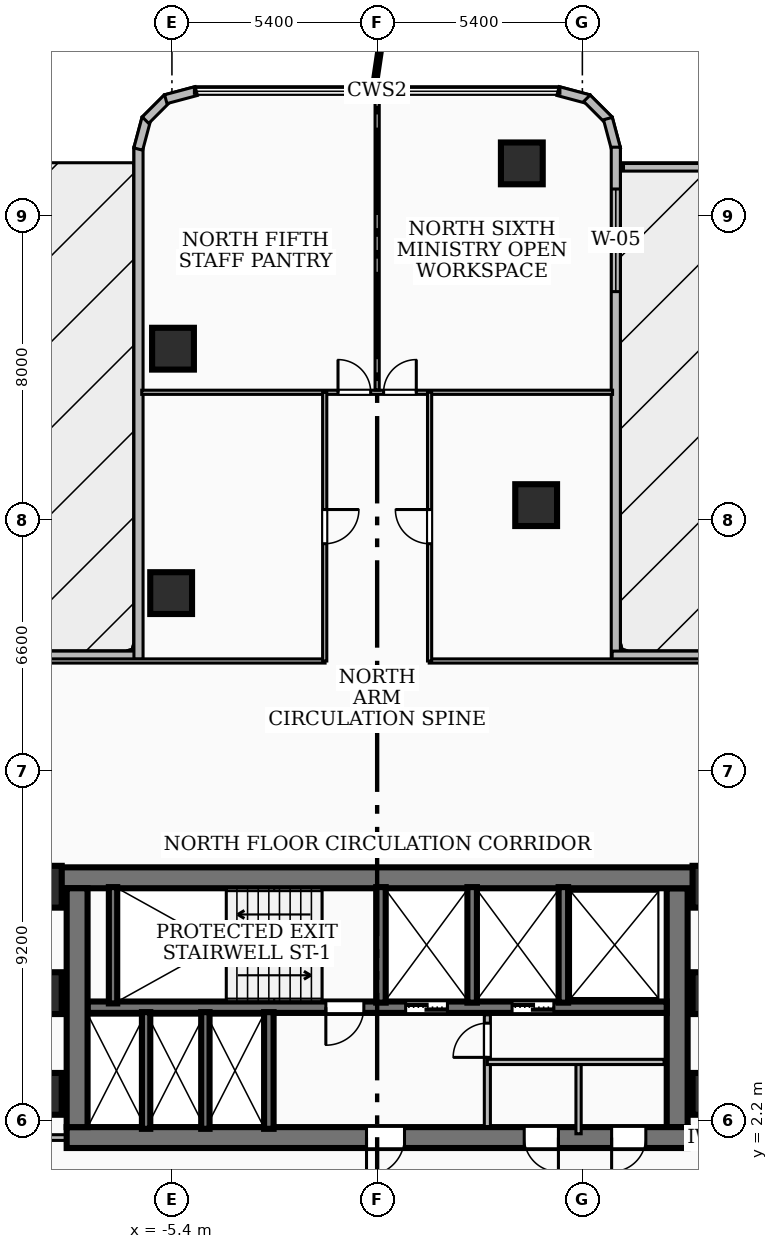
"""IFC4 building model, lengths in metres.
Left out: names, types, materials, properties, quantities, classifications, styles, units other than length and angle.
Written with IfcOpenShell. Run it as: python <this file> out.ifc"""

import sys

from ifc_helpers import new_model, si_unit, direction, frame, frame_2d, origin, origin_2d, place, context, subcontext, project, spatial, rectangle, extrude, element, fill, save


model = new_model("IFC4")
c1 = context("Model", 3, precision=1e-05, world=origin(), true_north=direction((0.0, 1.0)))
c2 = subcontext(c1, "Body", "Model", "MODEL_VIEW")
j1 = project(units=[si_unit("LENGTHUNIT", "METRE"), si_unit("PLANEANGLEUNIT", "RADIAN")], contexts=[c1])
p1 = place(None, origin())
s1 = spatial("IfcSite", under=j1, at=p1, CompositionType="ELEMENT")
p2 = place(p1, origin())
s2 = spatial("IfcBuilding", under=s1, at=p2, CompositionType="ELEMENT")
p3 = place(p2, frame((0.0, 0.0, 24.48)))
s3 = spatial("IfcBuildingStorey", under=s2, at=p3, CompositionType="ELEMENT", Elevation=24.48)
p4 = place(p3, frame((-8.78, 8.585, 0.0), z_axis=(0.0, 0.0, 1.0), x_axis=(1.0, 0.0, 0.0)))
e1 = element("IfcWall", 1, at=p4, inside=s3, PredefinedType="SHEAR", context=c2, shape_type="SweptSolid", body=[
    extrude(rectangle(XDim=17.56, YDim=0.55, at=frame_2d((8.78, 0.0))), origin(), (0.0, 0.0, 1.0), 3.34),
])
p5 = place(p3, frame((8.17, 1.75, 0.0), z_axis=(0.0, 0.0, 1.0), x_axis=(-1.0, 0.0, 0.0)))
e2 = element("IfcWall", 2, at=p5, inside=s3, PredefinedType="SHEAR", context=c2, shape_type="SweptSolid", body=[
    extrude(rectangle(XDim=16.34, YDim=0.55, at=frame_2d((8.17, 0.0))), origin(), (0.0, 0.0, 1.0), 3.34),
])
p6 = place(p5, frame((7.45, 0.0, 0.0)))
e3 = element("IfcOpeningElement", 3, at=p6, cuts=e2, PredefinedType="OPENING", context=c2, shape_type="SweptSolid", body=[
    extrude(rectangle(XDim=1.0, YDim=2.1, at=frame_2d((0.5, 1.05))), frame((0.0, 0.285, 0.0), z_axis=(0.0, -1.0, 0.0), x_axis=(1.0, 0.0, 0.0)), (0.0, 0.0, 1.0), 0.57),
])
p7 = place(p5, frame((3.4, 0.0, 0.0)))
e4 = element("IfcOpeningElement", 4, at=p7, cuts=e2, PredefinedType="OPENING", context=c2, shape_type="SweptSolid", body=[
    extrude(rectangle(XDim=0.9, YDim=2.06, at=frame_2d((0.45, 1.03))), frame((0.0, 0.285, 0.0), z_axis=(0.0, -1.0, 0.0), x_axis=(1.0, 0.0, 0.0)), (0.0, 0.0, 1.0), 0.57),
])
p8 = place(p5, frame((1.1, 0.0, 0.0)))
e5 = element("IfcOpeningElement", 5, at=p8, cuts=e2, PredefinedType="OPENING", context=c2, shape_type="SweptSolid", body=[
    extrude(rectangle(XDim=0.9, YDim=2.06, at=frame_2d((0.45, 1.03))), frame((0.0, 0.285, 0.0), z_axis=(0.0, -1.0, 0.0), x_axis=(1.0, 0.0, 0.0)), (0.0, 0.0, 1.0), 0.57),
])
for number, where, z_axis, x_axis in (
    (6, (-7.895, 2.025, 0.0), (0.0, 0.0, 1.0), (0.0, 1.0, 0.0)),
    (7, (7.895, 8.31, 0.0), (0.0, 0.0, 1.0), (0.0, -1.0, 0.0)),
):
    element("IfcWall", number, at=place(p3, frame(where, z_axis=z_axis, x_axis=x_axis)), inside=s3, PredefinedType="SHEAR", context=c2, shape_type="SweptSolid", body=[
        extrude(rectangle(XDim=6.285, YDim=0.55, at=frame_2d((3.143, 0.0))), origin(), (0.0, 0.0, 1.0), 3.34),
    ])
p9 = place(p3, frame((7.62, 5.18, 0.0), z_axis=(0.0, 0.0, 1.0), x_axis=(-1.0, 0.0, 0.0)))
e8 = element("IfcWall", 8, at=p9, inside=s3, PredefinedType="SOLIDWALL", context=c2, shape_type="SweptSolid", body=[
    extrude(rectangle(XDim=15.24, YDim=0.3, at=frame_2d((7.62, 0.0))), origin(), (0.0, 0.0, 1.0), 3.34),
])
p10 = place(p9, frame((5.77, 0.0, 0.0)))
e9 = element("IfcOpeningElement", 9, at=p10, cuts=e8, PredefinedType="OPENING", context=c2, shape_type="SweptSolid", body=[
    extrude(rectangle(XDim=1.1, YDim=2.15, at=frame_2d((0.55, 1.075))), frame((0.0, 0.16, 0.0), z_axis=(0.0, -1.0, 0.0), x_axis=(1.0, 0.0, 0.0)), (0.0, 0.0, 1.0), 0.32),
])
p11 = place(p9, frame((2.97, 0.0, 0.0)))
e10 = element("IfcOpeningElement", 10, at=p11, cuts=e8, PredefinedType="OPENING", context=c2, shape_type="SweptSolid", body=[
    extrude(rectangle(XDim=1.1, YDim=2.15, at=frame_2d((0.55, 1.075))), frame((0.0, 0.16, 0.0), z_axis=(0.0, -1.0, 0.0), x_axis=(1.0, 0.0, 0.0)), (0.0, 0.0, 1.0), 0.32),
])
p12 = place(p9, frame((7.97, 0.0, 0.0)))
e11 = element("IfcOpeningElement", 11, at=p12, cuts=e8, PredefinedType="OPENING", context=c2, shape_type="SweptSolid", body=[
    extrude(rectangle(XDim=1.0, YDim=2.1, at=frame_2d((0.5, 1.05))), frame((0.0, 0.16, 0.0), z_axis=(0.0, -1.0, 0.0), x_axis=(1.0, 0.0, 0.0)), (0.0, 0.0, 1.0), 0.32),
])
p13 = place(p3, frame((-6.95, 5.28, 0.0), z_axis=(0.0, 0.0, 1.0), x_axis=(0.0, 1.0, 0.0)))
e12 = element("IfcWall", 12, at=p13, inside=s3, PredefinedType="SOLIDWALL", context=c2, shape_type="SweptSolid", body=[
    extrude(rectangle(XDim=3.06, YDim=0.22, at=frame_2d((1.53, 0.0))), origin(), (0.0, 0.0, 1.0), 3.34),
])
for number, where, z_axis, x_axis in (
    (13, (0.1, 5.3, 0.0), (0.0, 0.0, 1.0), (0.0, 1.0, 0.0)),
    (14, (2.5, 5.3, 0.0), (0.0, 0.0, 1.0), (0.0, 1.0, 0.0)),
    (15, (4.9, 5.3, 0.0), (0.0, 0.0, 1.0), (0.0, 1.0, 0.0)),
):
    element("IfcWall", number, at=place(p3, frame(where, z_axis=z_axis, x_axis=x_axis)), inside=s3, PredefinedType="SOLIDWALL", context=c2, shape_type="SweptSolid", body=[
        extrude(rectangle(XDim=3.04, YDim=0.25, at=frame_2d((1.52, 0.0))), origin(), (0.0, 0.0, 1.0), 3.34),
    ])
p14 = place(p3, frame((-2.85, 1.98, 0.0), z_axis=(0.0, 0.0, 1.0), x_axis=(0.0, 1.0, 0.0)))
e16 = element("IfcWall", 16, at=p14, inside=s3, PredefinedType="SOLIDWALL", context=c2, shape_type="SweptSolid", body=[
    extrude(rectangle(XDim=3.07, YDim=0.25, at=frame_2d((1.535, 0.0))), origin(), (0.0, 0.0, 1.0), 3.34),
])
for number, where, z_axis, x_axis in (
    (17, (-6.08, 1.98, 0.0), (0.0, 0.0, 1.0), (0.0, 1.0, 0.0)),
    (18, (-4.52, 1.98, 0.0), (0.0, 0.0, 1.0), (0.0, 1.0, 0.0)),
):
    element("IfcWall", number, at=place(p3, frame(where, z_axis=z_axis, x_axis=x_axis)), inside=s3, PredefinedType="SOLIDWALL", context=c2, shape_type="SweptSolid", body=[
        extrude(rectangle(XDim=3.07, YDim=0.22, at=frame_2d((1.535, 0.0))), origin(), (0.0, 0.0, 1.0), 3.34),
    ])
for number, where, z_axis, x_axis in (
    (19, (-8.85, 2.9, 0.0), (0.0, 0.0, 1.0), (1.0, 0.0, 0.0)),
    (20, (-8.85, 5.55, 0.0), (0.0, 0.0, 1.0), (1.0, 0.0, 0.0)),
    (21, (8.85, 2.9, 0.0), (0.0, 0.0, 1.0), (1.0, 0.0, 0.0)),
    (22, (8.85, 5.55, 0.0), (0.0, 0.0, 1.0), (1.0, 0.0, 0.0)),
    (23, (-8.85, 8.35, 0.0), (0.0, 0.0, 1.0), (1.0, 0.0, 0.0)),
    (24, (8.85, 8.35, 0.0), (0.0, 0.0, 1.0), (1.0, 0.0, 0.0)),
    (25, (4.184, 18.391, 0.0), (0.0, 0.0, 1.0), (1.0, 0.0, 0.0)),
    (26, (-5.421, 16.076, 0.0), (0.0, 0.0, 1.0), (1.0, 0.0, 0.0)),
    (27, (3.807, 27.383, 0.0), (0.0, 0.0, 1.0), (1.0, 0.0, 0.0)),
    (28, (-5.372, 22.507, 0.0), (0.0, 0.0, 1.0), (1.0, 0.0, 0.0)),
):
    element("IfcColumn", number, at=place(p3, frame(where, z_axis=z_axis, x_axis=x_axis)), inside=s3, PredefinedType="COLUMN", context=c2, shape_type="SweptSolid", body=[
        extrude(rectangle(XDim=1.1, YDim=1.1, at=origin_2d()), origin(), (0.0, 0.0, 1.0), 3.6),
    ])
p15 = place(p3, frame((-12.959, 14.43, 0.0), z_axis=(0.0, 0.0, 1.0), x_axis=(1.0, 0.0, 0.0)))
e29 = element("IfcWall", 29, at=p15, inside=s3, PredefinedType="SOLIDWALL", context=c2, shape_type="SweptSolid", body=[
    extrude(rectangle(XDim=6.775, YDim=0.24, at=frame_2d((3.387, 0.0))), origin(), (0.0, 0.0, 1.0), 2.421),
])
p16 = place(p3, frame((-6.28, 14.334, 0.0), z_axis=(0.0, 0.0, 1.0), x_axis=(0.0, 1.0, 0.0)))
e30 = element("IfcWall", 30, at=p16, inside=s3, PredefinedType="SOLIDWALL", context=c2, shape_type="SweptSolid", body=[
    extrude(rectangle(XDim=13.475, YDim=0.24, at=frame_2d((6.738, 0.0))), origin(), (0.0, 0.0, 1.0), 2.421),
])
p17 = place(p3, frame((-6.286, 27.76, 0.0), z_axis=(0.0, 0.0, 1.0), x_axis=(0.25766265056, 0.966234939601, 0.0)))
e31 = element("IfcWall", 31, at=p17, inside=s3, PredefinedType="SOLIDWALL", context=c2, shape_type="SweptSolid", body=[
    extrude(rectangle(XDim=0.83, YDim=0.24, at=frame_2d((0.415, 0.0))), origin(), (0.0, 0.0, 1.0), 3.34),
])
p18 = place(p3, frame((-6.096, 28.52, 0.0), z_axis=(0.0, 0.0, 1.0), x_axis=(0.707106781187, 0.707106781187, 0.0)))
e32 = element("IfcWall", 32, at=p18, inside=s3, PredefinedType="SOLIDWALL", context=c2, shape_type="SweptSolid", body=[
    extrude(rectangle(XDim=0.814, YDim=0.24, at=frame_2d((0.407, 0.0))), origin(), (0.0, 0.0, 1.0), 3.34),
])
for number, where, z_axis, x_axis in (
    (33, (-5.562, 29.072, 0.0), (0.0, 0.0, 1.0), (0.966, 0.258, 0.0)),
    (34, (4.76, 29.286, 0.0), (0.0, 0.0, 1.0), (0.966, -0.258, 0.0)),
):
    element("IfcWall", number, at=place(p3, frame(where, z_axis=z_axis, x_axis=x_axis)), inside=s3, PredefinedType="SOLIDWALL", context=c2, shape_type="SweptSolid", body=[
        extrude(rectangle(XDim=0.83, YDim=0.24, at=frame_2d((0.415, 0.0))), origin(), (0.0, 0.0, 1.0), 3.34),
    ])
p19 = place(p3, frame((5.52, 29.096, 0.0), z_axis=(0.0, 0.0, 1.0), x_axis=(0.707106781187, -0.707106781187, 0.0)))
e35 = element("IfcWall", 35, at=p19, inside=s3, PredefinedType="SOLIDWALL", context=c2, shape_type="SweptSolid", body=[
    extrude(rectangle(XDim=0.814, YDim=0.24, at=frame_2d((0.407, 0.0))), origin(), (0.0, 0.0, 1.0), 3.34),
])
p20 = place(p3, frame((6.072, 28.562, 0.0), z_axis=(0.0, 0.0, 1.0), x_axis=(0.25766265056, -0.966234939601, 0.0)))
e36 = element("IfcWall", 36, at=p20, inside=s3, PredefinedType="SOLIDWALL", context=c2, shape_type="SweptSolid", body=[
    extrude(rectangle(XDim=0.83, YDim=0.24, at=frame_2d((0.415, 0.0))), origin(), (0.0, 0.0, 1.0), 3.34),
])
p21 = place(p3, frame((6.28, 27.809, 0.0), z_axis=(0.0, 0.0, 1.0), x_axis=(0.0, -1.0, 0.0)))
e37 = element("IfcWall", 37, at=p21, inside=s3, PredefinedType="SOLIDWALL", context=c2, shape_type="SweptSolid", body=[
    extrude(rectangle(XDim=13.475, YDim=0.24, at=frame_2d((6.738, 0.0))), origin(), (0.0, 0.0, 1.0), 3.34),
])
p22 = place(p21, frame((1.1, 0.0, 0.85)))
e38 = element("IfcOpeningElement", 38, at=p22, cuts=e37, PredefinedType="OPENING", context=c2, shape_type="SweptSolid", body=[
    extrude(rectangle(XDim=2.7, YDim=1.85, at=frame_2d((1.35, 0.925))), frame((0.0, 0.13, 0.0), z_axis=(0.0, -1.0, 0.0), x_axis=(1.0, 0.0, 0.0)), (0.0, 0.0, 1.0), 0.26),
])
p23 = place(p3, frame((6.184, 14.43, 0.0), z_axis=(0.0, 0.0, 1.0), x_axis=(1.0, 0.0, 0.0)))
e39 = element("IfcWall", 39, at=p23, inside=s3, PredefinedType="SOLIDWALL", context=c2, shape_type="SweptSolid", body=[
    extrude(rectangle(XDim=6.775, YDim=0.24, at=frame_2d((3.387, 0.0))), origin(), (0.0, 0.0, 1.0), 3.34),
])
p24 = place(p3, frame((33.42, 27.28, 0.0), z_axis=(0.0, 0.0, 1.0), x_axis=(-1.0, 0.0, 0.0)))
e40 = element("IfcWall", 40, at=p24, inside=s3, PredefinedType="PARAPET", context=c2, shape_type="SweptSolid", body=[
    extrude(rectangle(XDim=26.938, YDim=0.2, at=frame_2d((13.469, 0.0))), origin(), (0.0, 0.0, 1.0), 0.88),
])
p25 = place(p3, frame((2.9, 2.04, 0.0), z_axis=(0.0, 0.0, 1.0), x_axis=(0.0, 1.0, 0.0)))
e41 = element("IfcWall", 41, at=p25, inside=s3, PredefinedType="PARTITIONING", context=c2, shape_type="SweptSolid", body=[
    extrude(rectangle(XDim=2.94, YDim=0.16, at=frame_2d((1.47, 0.0))), origin(), (0.0, 0.0, 1.0), 2.405),
])
p26 = place(p25, frame((1.82, 0.0, 0.0)))
e42 = element("IfcOpeningElement", 42, at=p26, cuts=e41, PredefinedType="OPENING", context=c2, shape_type="SweptSolid", body=[
    extrude(rectangle(XDim=0.9, YDim=2.06, at=frame_2d((0.45, 1.03))), frame((0.0, 0.09, 0.0), z_axis=(0.0, -1.0, 0.0), x_axis=(1.0, 0.0, 0.0)), (0.0, 0.0, 1.0), 0.18),
])
p27 = place(p3, frame((2.9, 3.74, 0.0), z_axis=(0.0, 0.0, 1.0), x_axis=(1.0, 0.0, 0.0)))
e43 = element("IfcWall", 43, at=p27, inside=s3, PredefinedType="PARTITIONING", context=c2, shape_type="SweptSolid", body=[
    extrude(rectangle(XDim=4.65, YDim=0.138, at=frame_2d((2.325, 0.0))), origin(), (0.0, 0.0, 1.0), 3.34),
])
p28 = place(p3, frame((5.3, 1.85, 0.0), z_axis=(0.0, 0.0, 1.0), x_axis=(0.0, 1.0, 0.0)))
e44 = element("IfcWall", 44, at=p28, inside=s3, PredefinedType="PARTITIONING", context=c2, shape_type="SweptSolid", body=[
    extrude(rectangle(XDim=1.89, YDim=0.138, at=frame_2d((0.945, 0.0))), origin(), (0.0, 0.0, 1.0), 2.405),
])
for number, where, z_axis, x_axis in (
    (45, (-7.85, 1.75, 0.0), (0.0, 0.0, 1.0), (-1.0, 0.0, 0.0)),
    (46, (7.85, 1.75, 0.0), (0.0, 0.0, 1.0), (1.0, 0.0, 0.0)),
):
    element("IfcWall", number, at=place(p3, frame(where, z_axis=z_axis, x_axis=x_axis)), inside=s3, PredefinedType="PARTITIONING", context=c2, shape_type="SweptSolid", body=[
        extrude(rectangle(XDim=1.67, YDim=0.15, at=frame_2d((0.835, 0.0))), origin(), (0.0, 0.0, 1.0), 2.405),
    ])
for number, where, z_axis, x_axis in (
    (47, (-1.37, 14.29, 0.0), (0.0, 0.0, 1.0), (-1.0, 0.0, 0.0)),
    (48, (9.32, 14.29, 0.0), (0.0, 0.0, 1.0), (-1.0, 0.0, 0.0)),
):
    element("IfcWall", number, at=place(p3, frame(where, z_axis=z_axis, x_axis=x_axis)), inside=s3, PredefinedType="PARTITIONING", context=c2, shape_type="SweptSolid", body=[
        extrude(rectangle(XDim=7.95, YDim=0.11, at=frame_2d((3.975, 0.0))), origin(), (0.0, 0.0, 1.0), 2.421),
    ])
p29 = place(p3, frame((-1.38, 21.36, 0.0), z_axis=(0.0, 0.0, 1.0), x_axis=(0.0, -1.0, 0.0)))
e49 = element("IfcWall", 49, at=p29, inside=s3, PredefinedType="PARTITIONING", context=c2, shape_type="SweptSolid", body=[
    extrude(rectangle(XDim=7.07, YDim=0.11, at=frame_2d((3.535, 0.0))), origin(), (0.0, 0.0, 1.0), 2.869),
])
p30 = place(p29, frame((3.085, 0.0, 0.0)))
e50 = element("IfcOpeningElement", 50, at=p30, cuts=e49, PredefinedType="OPENING", context=c2, shape_type="SweptSolid", body=[
    extrude(rectangle(XDim=0.9, YDim=2.06, at=frame_2d((0.45, 1.03))), frame((0.0, 0.065, 0.0), z_axis=(0.0, -1.0, 0.0), x_axis=(1.0, 0.0, 0.0)), (0.0, 0.0, 1.0), 0.13),
])
p31 = place(p3, frame((1.38, 14.29, 0.0), z_axis=(0.0, 0.0, 1.0), x_axis=(0.0, 1.0, 0.0)))
e51 = element("IfcWall", 51, at=p31, inside=s3, PredefinedType="PARTITIONING", context=c2, shape_type="SweptSolid", body=[
    extrude(rectangle(XDim=7.07, YDim=0.11, at=frame_2d((3.535, 0.0))), origin(), (0.0, 0.0, 1.0), 2.869),
])
p32 = place(p31, frame((3.085, 0.0, 0.0)))
e52 = element("IfcOpeningElement", 52, at=p32, cuts=e51, PredefinedType="OPENING", context=c2, shape_type="SweptSolid", body=[
    extrude(rectangle(XDim=0.9, YDim=2.06, at=frame_2d((0.45, 1.03))), frame((0.0, 0.065, 0.0), z_axis=(0.0, -1.0, 0.0), x_axis=(1.0, 0.0, 0.0)), (0.0, 0.0, 1.0), 0.13),
])
p33 = place(p3, frame((0.0, 21.42, 0.0), z_axis=(0.0, 0.0, 1.0), x_axis=(0.0, 1.0, 0.0)))
e53 = element("IfcWall", 53, at=p33, inside=s3, PredefinedType="PARTITIONING", context=c2, shape_type="SweptSolid", body=[
    extrude(rectangle(XDim=7.775, YDim=0.11, at=frame_2d((3.888, 0.0))), origin(), (0.0, 0.0, 1.0), 2.72),
])
p34 = place(p3, frame((-6.195, 21.36, 0.0), z_axis=(0.0, 0.0, 1.0), x_axis=(1.0, 0.0, 0.0)))
e54 = element("IfcWall", 54, at=p34, inside=s3, PredefinedType="PARTITIONING", context=c2, shape_type="SweptSolid", body=[
    extrude(rectangle(XDim=12.39, YDim=0.11, at=frame_2d((6.195, 0.0))), origin(), (0.0, 0.0, 1.0), 2.421),
])
p35 = place(p34, frame((6.365, 0.0, 0.0)))
e55 = element("IfcOpeningElement", 55, at=p35, cuts=e54, PredefinedType="OPENING", context=c2, shape_type="SweptSolid", body=[
    extrude(rectangle(XDim=0.86, YDim=2.04, at=frame_2d((0.43, 1.02))), frame((0.0, 0.065, 0.0), z_axis=(0.0, -1.0, 0.0), x_axis=(1.0, 0.0, 0.0)), (0.0, 0.0, 1.0), 0.13),
])
p36 = place(p34, frame((5.165, 0.0, 0.0)))
e56 = element("IfcOpeningElement", 56, at=p36, cuts=e54, PredefinedType="OPENING", context=c2, shape_type="SweptSolid", body=[
    extrude(rectangle(XDim=0.86, YDim=2.04, at=frame_2d((0.43, 1.02))), frame((0.0, 0.065, 0.0), z_axis=(0.0, -1.0, 0.0), x_axis=(1.0, 0.0, 0.0)), (0.0, 0.0, 1.0), 0.13),
])
p37 = place(p22, origin())
e57 = element("IfcWindow", 57, at=p37, inside=s3, PartitioningType="SINGLE_PANEL", PredefinedType="WINDOW", context=c2, shape_type="SweptSolid", body=[
    extrude(rectangle(XDim=2.7, YDim=1.85, at=frame_2d((1.35, 0.925))), frame((0.0, 0.03, 0.0), z_axis=(0.0, -1.0, 0.0), x_axis=(1.0, 0.0, 0.0)), (0.0, 0.0, 1.0), 0.06),
])
fill(e38, e57)
p38 = place(p6, origin())
e58 = element("IfcDoor", 58, at=p38, inside=s3, OperationType="SINGLE_SWING_RIGHT", PredefinedType="DOOR", context=c2, shape_type="SweptSolid", body=[
    extrude(rectangle(XDim=1.0, YDim=2.1, at=frame_2d((0.5, 1.05))), frame((0.0, 0.025, 0.0), z_axis=(0.0, -1.0, 0.0), x_axis=(1.0, 0.0, 0.0)), (0.0, 0.0, 1.0), 0.05),
])
fill(e3, e58)
p39 = place(p10, origin())
e59 = element("IfcDoor", 59, at=p39, inside=s3, OperationType="DOUBLE_DOOR_SLIDING", PredefinedType="DOOR", context=c2, shape_type="SweptSolid", body=[
    extrude(rectangle(XDim=1.1, YDim=2.15, at=frame_2d((0.55, 1.075))), frame((0.0, 0.025, 0.0), z_axis=(0.0, -1.0, 0.0), x_axis=(1.0, 0.0, 0.0)), (0.0, 0.0, 1.0), 0.05),
])
fill(e9, e59)
p40 = place(p11, origin())
e60 = element("IfcDoor", 60, at=p40, inside=s3, OperationType="DOUBLE_DOOR_SLIDING", PredefinedType="DOOR", context=c2, shape_type="SweptSolid", body=[
    extrude(rectangle(XDim=1.1, YDim=2.15, at=frame_2d((0.55, 1.075))), frame((0.0, 0.025, 0.0), z_axis=(0.0, -1.0, 0.0), x_axis=(1.0, 0.0, 0.0)), (0.0, 0.0, 1.0), 0.05),
])
fill(e10, e60)
p41 = place(p12, origin())
e61 = element("IfcDoor", 61, at=p41, inside=s3, OperationType="SINGLE_SWING_RIGHT", PredefinedType="DOOR", context=c2, shape_type="SweptSolid", body=[
    extrude(rectangle(XDim=1.0, YDim=2.1, at=frame_2d((0.5, 1.05))), frame((0.0, 0.025, 0.0), z_axis=(0.0, -1.0, 0.0), x_axis=(1.0, 0.0, 0.0)), (0.0, 0.0, 1.0), 0.05),
])
fill(e11, e61)
p42 = place(p7, origin())
e62 = element("IfcDoor", 62, at=p42, inside=s3, OperationType="SINGLE_SWING_LEFT", PredefinedType="DOOR", context=c2, shape_type="SweptSolid", body=[
    extrude(rectangle(XDim=0.9, YDim=2.06, at=frame_2d((0.45, 1.03))), frame((0.0, 0.025, 0.0), z_axis=(0.0, -1.0, 0.0), x_axis=(1.0, 0.0, 0.0)), (0.0, 0.0, 1.0), 0.05),
])
fill(e4, e62)
p43 = place(p8, origin())
e63 = element("IfcDoor", 63, at=p43, inside=s3, OperationType="SINGLE_SWING_RIGHT", PredefinedType="DOOR", context=c2, shape_type="SweptSolid", body=[
    extrude(rectangle(XDim=0.9, YDim=2.06, at=frame_2d((0.45, 1.03))), frame((0.0, 0.025, 0.0), z_axis=(0.0, -1.0, 0.0), x_axis=(1.0, 0.0, 0.0)), (0.0, 0.0, 1.0), 0.05),
])
fill(e5, e63)
p44 = place(p26, origin())
e64 = element("IfcDoor", 64, at=p44, inside=s3, OperationType="SINGLE_SWING_LEFT", PredefinedType="DOOR", context=c2, shape_type="SweptSolid", body=[
    extrude(rectangle(XDim=0.9, YDim=2.06, at=frame_2d((0.45, 1.03))), frame((0.0, 0.025, 0.0), z_axis=(0.0, -1.0, 0.0), x_axis=(1.0, 0.0, 0.0)), (0.0, 0.0, 1.0), 0.05),
])
fill(e42, e64)
p45 = place(p30, origin())
e65 = element("IfcDoor", 65, at=p45, inside=s3, OperationType="SINGLE_SWING_LEFT", PredefinedType="DOOR", context=c2, shape_type="SweptSolid", body=[
    extrude(rectangle(XDim=0.9, YDim=2.06, at=frame_2d((0.45, 1.03))), frame((0.0, 0.025, 0.0), z_axis=(0.0, -1.0, 0.0), x_axis=(1.0, 0.0, 0.0)), (0.0, 0.0, 1.0), 0.05),
])
fill(e50, e65)
p46 = place(p32, origin())
e66 = element("IfcDoor", 66, at=p46, inside=s3, OperationType="SINGLE_SWING_RIGHT", PredefinedType="DOOR", context=c2, shape_type="SweptSolid", body=[
    extrude(rectangle(XDim=0.9, YDim=2.06, at=frame_2d((0.45, 1.03))), frame((0.0, 0.025, 0.0), z_axis=(0.0, -1.0, 0.0), x_axis=(1.0, 0.0, 0.0)), (0.0, 0.0, 1.0), 0.05),
])
fill(e52, e66)
p47 = place(p35, origin())
e67 = element("IfcDoor", 67, at=p47, inside=s3, OperationType="SINGLE_SWING_RIGHT", PredefinedType="DOOR", context=c2, shape_type="SweptSolid", body=[
    extrude(rectangle(XDim=0.86, YDim=2.04, at=frame_2d((0.43, 1.02))), frame((0.0, 0.025, 0.0), z_axis=(0.0, -1.0, 0.0), x_axis=(1.0, 0.0, 0.0)), (0.0, 0.0, 1.0), 0.05),
])
fill(e55, e67)
p48 = place(p36, origin())
e68 = element("IfcDoor", 68, at=p48, inside=s3, OperationType="SINGLE_SWING_LEFT", PredefinedType="DOOR", context=c2, shape_type="SweptSolid", body=[
    extrude(rectangle(XDim=0.86, YDim=2.04, at=frame_2d((0.43, 1.02))), frame((0.0, 0.025, 0.0), z_axis=(0.0, -1.0, 0.0), x_axis=(1.0, 0.0, 0.0)), (0.0, 0.0, 1.0), 0.05),
])
fill(e56, e68)
save(model, sys.argv[1])
